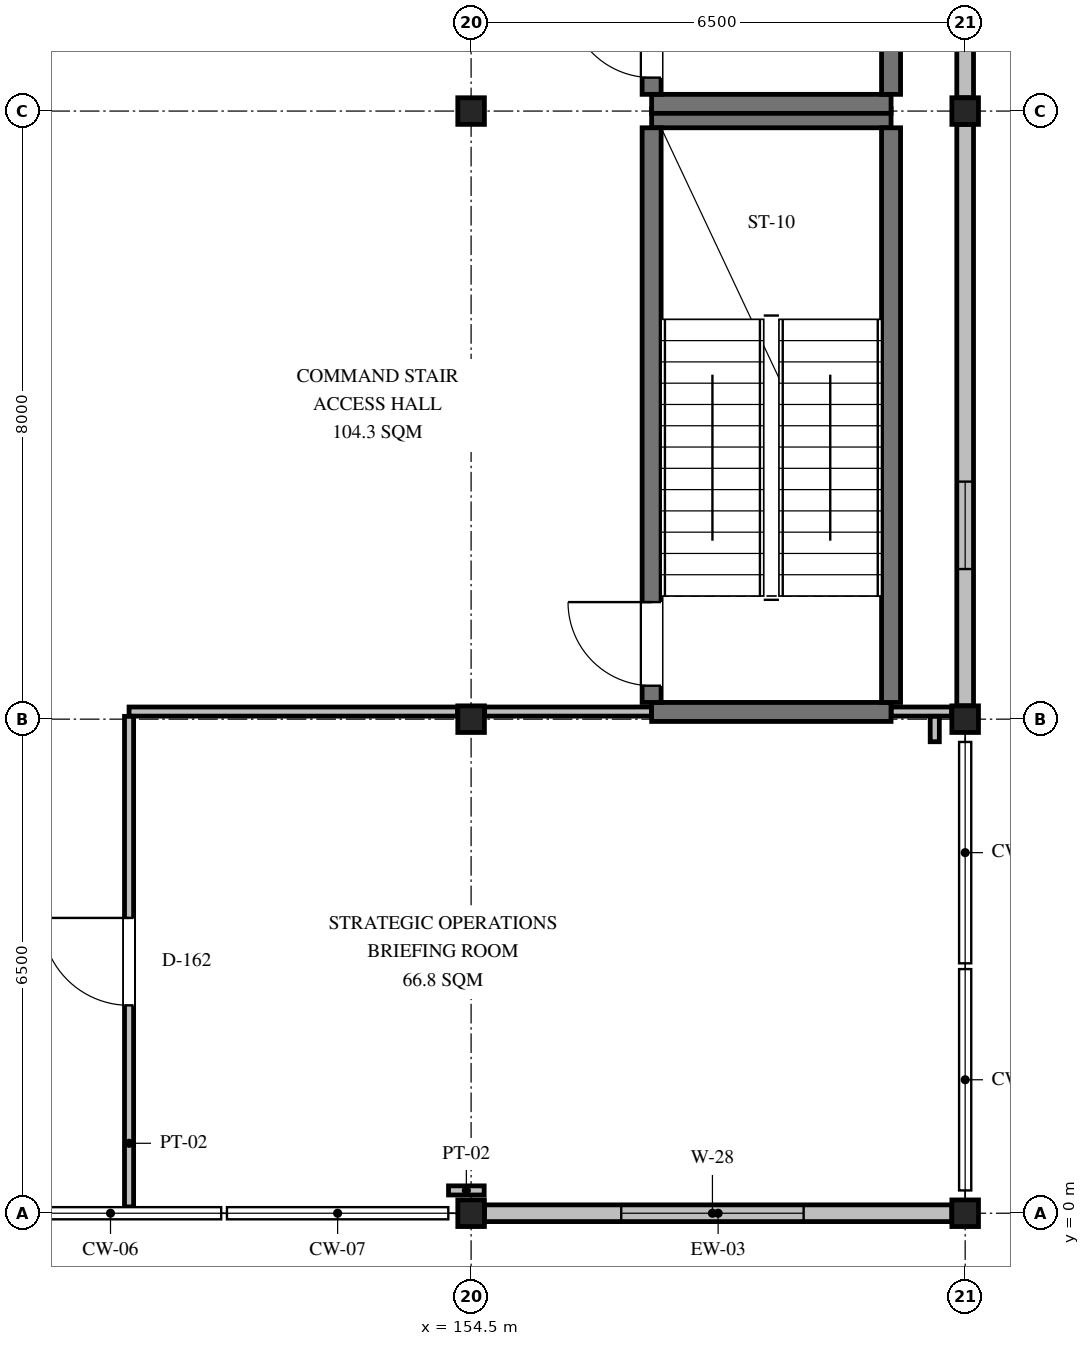
"""IFC4 building model, lengths in metres.
Left out: names, types, materials, properties, quantities, classifications, styles, units other than length and angle.
Written with IfcOpenShell. Run it as: python <this file> out.ifc"""

import sys

from ifc_helpers import new_model, si_unit, direction, frame, frame_2d, origin, origin_2d, place, context, subcontext, project, spatial, rectangle, i_section, extrude, element, fill, save


model = new_model("IFC4")
c1 = context("Model", 3, precision=1e-05, world=origin(), true_north=direction((0.0, 1.0)))
c2 = subcontext(c1, "Body", "Model", "MODEL_VIEW")
j1 = project(units=[si_unit("LENGTHUNIT", "METRE"), si_unit("PLANEANGLEUNIT", "RADIAN")], contexts=[c1])
p1 = place(None, origin())
s1 = spatial("IfcSite", under=j1, at=p1, CompositionType="ELEMENT")
p2 = place(p1, origin())
s2 = spatial("IfcBuilding", under=s1, at=p2, CompositionType="ELEMENT")
p3 = place(p2, frame((0.0, 0.0, 10.05)))
s3 = spatial("IfcBuildingStorey", under=s2, at=p3, CompositionType="ELEMENT", Elevation=10.05)
for number, where, z_axis, x_axis in (
    (1, (154.5, 0.0, 0.0), (0.0, 0.0, 1.0), (1.0, 0.0, 0.0)),
    (2, (154.5, 6.5, 0.0), (0.0, 0.0, 1.0), (1.0, 0.0, 0.0)),
    (3, (154.5, 14.5, 0.0), (0.0, 0.0, 1.0), (1.0, 0.0, 0.0)),
    (4, (161.0, 0.0, 0.0), (0.0, 0.0, 1.0), (1.0, 0.0, 0.0)),
    (5, (161.0, 6.5, 0.0), (0.0, 0.0, 1.0), (1.0, 0.0, 0.0)),
    (6, (161.0, 14.5, 0.0), (0.0, 0.0, 1.0), (1.0, 0.0, 0.0)),
):
    element("IfcColumn", number, at=place(p3, frame(where, z_axis=z_axis, x_axis=x_axis)), inside=s3, PredefinedType="COLUMN", context=c2, shape_type="SweptSolid", body=[
        extrude(i_section(OverallWidth=0.35, OverallDepth=0.35, WebThickness=0.012, FlangeThickness=0.019, FilletRadius=0.02, at=origin_2d()), origin(), (0.0, 0.0, 1.0), 4.2),
    ])
p4 = place(p3, frame((154.675, 0.0, 0.0), z_axis=(0.0, 0.0, 1.0), x_axis=(1.0, 0.0, 0.0)))
e7 = element("IfcWall", 7, at=p4, inside=s3, PredefinedType="SOLIDWALL", context=c2, shape_type="SweptSolid", body=[
    extrude(rectangle(XDim=6.15, YDim=0.22, at=frame_2d((3.075, 0.0))), origin(), (0.0, 0.0, 1.0), 3.594),
])
p5 = place(p4, frame((1.8, 0.0, 1.0)))
e8 = element("IfcOpeningElement", 8, at=p5, cuts=e7, PredefinedType="OPENING", context=c2, shape_type="SweptSolid", body=[
    extrude(rectangle(XDim=2.4, YDim=1.8, at=frame_2d((1.2, 0.9))), frame((0.0, 0.12, 0.0), z_axis=(0.0, -1.0, 0.0), x_axis=(1.0, 0.0, 0.0)), (0.0, 0.0, 1.0), 0.24),
])
p6 = place(p3, frame((161.0, 6.675, 0.0), z_axis=(0.0, 0.0, 1.0), x_axis=(0.0, 1.0, 0.0)))
e9 = element("IfcWall", 9, at=p6, inside=s3, PredefinedType="SOLIDWALL", context=c2, shape_type="SweptSolid", body=[
    extrude(rectangle(XDim=7.65, YDim=0.22, at=frame_2d((3.825, 0.0))), origin(), (0.0, 0.0, 1.0), 3.594),
])
p7 = place(p6, frame((1.8, 0.0, 1.05)))
e10 = element("IfcOpeningElement", 10, at=p7, cuts=e9, PredefinedType="OPENING", context=c2, shape_type="SweptSolid", body=[
    extrude(rectangle(XDim=1.15, YDim=2.0, at=frame_2d((0.575, 1.0))), frame((0.0, 0.12, 0.0), z_axis=(0.0, -1.0, 0.0), x_axis=(1.0, 0.0, 0.0)), (0.0, 0.0, 1.0), 0.24),
])
p8 = place(p3, frame((161.0, 14.675, 0.0), z_axis=(0.0, 0.0, 1.0), x_axis=(0.0, 1.0, 0.0)))
e11 = element("IfcWall", 11, at=p8, inside=s3, PredefinedType="SOLIDWALL", context=c2, shape_type="SweptSolid", body=[
    extrude(rectangle(XDim=7.65, YDim=0.22, at=frame_2d((3.825, 0.0))), origin(), (0.0, 0.0, 1.0), 3.554),
])
p9 = place(p8, frame((1.8, 0.0, 1.05)))
e12 = element("IfcOpeningElement", 12, at=p9, cuts=e11, PredefinedType="OPENING", context=c2, shape_type="SweptSolid", body=[
    extrude(rectangle(XDim=1.3, YDim=2.0, at=frame_2d((0.65, 1.0))), frame((0.0, 0.12, 0.0), z_axis=(0.0, -1.0, 0.0), x_axis=(1.0, 0.0, 0.0)), (0.0, 0.0, 1.0), 0.24),
])
for number, where, z_axis, x_axis in (
    (13, (156.875, 6.595, 0.0), (0.0, 0.0, 1.0), (1.0, 0.0, 0.0)),
    (14, (156.875, 14.405, 0.0), (0.0, 0.0, 1.0), (1.0, 0.0, 0.0)),
):
    element("IfcWall", number, at=place(p3, frame(where, z_axis=z_axis, x_axis=x_axis)), inside=s3, PredefinedType="SHEAR", context=c2, shape_type="SweptSolid", body=[
        extrude(rectangle(XDim=3.15, YDim=0.25, at=frame_2d((1.575, 0.0))), origin(), (0.0, 0.0, 1.0), 4.0),
    ])
p10 = place(p3, frame((156.875, 6.72, 0.0), z_axis=(0.0, 0.0, 1.0), x_axis=(0.0, 1.0, 0.0)))
e15 = element("IfcWall", 15, at=p10, inside=s3, PredefinedType="SHEAR", context=c2, shape_type="SweptSolid", body=[
    extrude(rectangle(XDim=7.56, YDim=0.25, at=frame_2d((3.78, 0.0))), origin(), (0.0, 0.0, 1.0), 4.0),
])
p11 = place(p10, frame((0.22, 0.0, 0.0)))
e16 = element("IfcOpeningElement", 16, at=p11, cuts=e15, PredefinedType="OPENING", context=c2, shape_type="SweptSolid", body=[
    extrude(rectangle(XDim=1.1, YDim=2.15, at=frame_2d((0.55, 1.075))), frame((0.0, 0.135, 0.0), z_axis=(0.0, -1.0, 0.0), x_axis=(1.0, 0.0, 0.0)), (0.0, 0.0, 1.0), 0.27),
])
p12 = place(p3, frame((160.025, 6.72, 0.0), z_axis=(0.0, 0.0, 1.0), x_axis=(0.0, 1.0, 0.0)))
e17 = element("IfcWall", 17, at=p12, inside=s3, PredefinedType="SHEAR", context=c2, shape_type="SweptSolid", body=[
    extrude(rectangle(XDim=7.56, YDim=0.25, at=frame_2d((3.78, 0.0))), origin(), (0.0, 0.0, 1.0), 4.0),
])
p13 = place(p3, frame((156.875, 14.595, 0.0), z_axis=(0.0, 0.0, 1.0), x_axis=(1.0, 0.0, 0.0)))
e18 = element("IfcWall", 18, at=p13, inside=s3, PredefinedType="SHEAR", context=c2, shape_type="SweptSolid", body=[
    extrude(rectangle(XDim=3.15, YDim=0.25, at=frame_2d((1.575, 0.0))), origin(), (0.0, 0.0, 1.0), 4.0),
])
p14 = place(p3, frame((156.875, 14.72, 0.0), z_axis=(0.0, 0.0, 1.0), x_axis=(0.0, 1.0, 0.0)))
e19 = element("IfcWall", 19, at=p14, inside=s3, PredefinedType="SHEAR", context=c2, shape_type="SweptSolid", body=[
    extrude(rectangle(XDim=7.56, YDim=0.25, at=frame_2d((3.78, 0.0))), origin(), (0.0, 0.0, 1.0), 4.0),
])
p15 = place(p14, frame((0.22, 0.0, 0.0)))
e20 = element("IfcOpeningElement", 20, at=p15, cuts=e19, PredefinedType="OPENING", context=c2, shape_type="SweptSolid", body=[
    extrude(rectangle(XDim=1.1, YDim=2.15, at=frame_2d((0.55, 1.075))), frame((0.0, 0.135, 0.0), z_axis=(0.0, -1.0, 0.0), x_axis=(1.0, 0.0, 0.0)), (0.0, 0.0, 1.0), 0.27),
])
p16 = place(p3, frame((160.025, 14.72, 0.0), z_axis=(0.0, 0.0, 1.0), x_axis=(0.0, 1.0, 0.0)))
e21 = element("IfcWall", 21, at=p16, inside=s3, PredefinedType="SHEAR", context=c2, shape_type="SweptSolid", body=[
    extrude(rectangle(XDim=7.56, YDim=0.25, at=frame_2d((3.78, 0.0))), origin(), (0.0, 0.0, 1.0), 4.0),
])
p17 = place(p3, frame((154.203, 0.3, 0.0), z_axis=(0.0, 0.0, 1.0), x_axis=(1.0, 0.0, 0.0)))
e22 = element("IfcWall", 22, at=p17, inside=s3, PredefinedType="PARTITIONING", context=c2, shape_type="SweptSolid", body=[
    extrude(rectangle(XDim=0.469, YDim=0.12, at=frame_2d((0.235, 0.0))), origin(), (0.0, 0.0, 1.0), 4.0),
])
p18 = place(p3, frame((150.0, 6.6, 0.0), z_axis=(0.0, 0.0, 1.0), x_axis=(1.0, 0.0, 0.0)))
e23 = element("IfcWall", 23, at=p18, inside=s3, PredefinedType="PARTITIONING", context=c2, shape_type="SweptSolid", body=[
    extrude(rectangle(XDim=4.322, YDim=0.12, at=frame_2d((2.161, 0.0))), origin(), (0.0, 0.0, 1.0), 3.294),
])
p19 = place(p3, frame((154.678, 6.6, 0.0), z_axis=(0.0, 0.0, 1.0), x_axis=(1.0, 0.0, 0.0)))
e24 = element("IfcWall", 24, at=p19, inside=s3, PredefinedType="PARTITIONING", context=c2, shape_type="SweptSolid", body=[
    extrude(rectangle(XDim=2.194, YDim=0.12, at=frame_2d((1.097, 0.0))), origin(), (0.0, 0.0, 1.0), 4.0),
])
p20 = place(p3, frame((160.028, 6.6, 0.0), z_axis=(0.0, 0.0, 1.0), x_axis=(1.0, 0.0, 0.0)))
e25 = element("IfcWall", 25, at=p20, inside=s3, PredefinedType="PARTITIONING", context=c2, shape_type="SweptSolid", body=[
    extrude(rectangle(XDim=0.794, YDim=0.12, at=frame_2d((0.397, 0.0))), origin(), (0.0, 0.0, 1.0), 4.0),
])
p21 = place(p3, frame((150.0, 0.083, 0.0), z_axis=(0.0, 0.0, 1.0), x_axis=(0.0, 1.0, 0.0)))
e26 = element("IfcWall", 26, at=p21, inside=s3, PredefinedType="PARTITIONING", context=c2, shape_type="SweptSolid", body=[
    extrude(rectangle(XDim=6.454, YDim=0.12, at=frame_2d((3.227, 0.0))), origin(), (0.0, 0.0, 1.0), 3.75),
])
p22 = place(p21, frame((2.652, 0.0, 0.0)))
e27 = element("IfcOpeningElement", 27, at=p22, cuts=e26, PredefinedType="OPENING", context=c2, shape_type="SweptSolid", body=[
    extrude(rectangle(XDim=1.15, YDim=2.1, at=frame_2d((0.575, 1.05))), frame((0.0, 0.07, 0.0), z_axis=(0.0, -1.0, 0.0), x_axis=(1.0, 0.0, 0.0)), (0.0, 0.0, 1.0), 0.14),
])
p23 = place(p3, frame((160.6, 6.203, 0.0), z_axis=(0.0, 0.0, 1.0), x_axis=(0.0, 1.0, 0.0)))
e28 = element("IfcWall", 28, at=p23, inside=s3, PredefinedType="PARTITIONING", context=c2, shape_type="SweptSolid", body=[
    extrude(rectangle(XDim=0.334, YDim=0.12, at=frame_2d((0.167, 0.0))), origin(), (0.0, 0.0, 1.0), 4.0),
])
p24 = place(p5, origin())
e29 = element("IfcWindow", 29, at=p24, inside=s3, PartitioningType="SINGLE_PANEL", PredefinedType="WINDOW", context=c2, shape_type="SweptSolid", body=[
    extrude(rectangle(XDim=2.4, YDim=1.8, at=frame_2d((1.2, 0.9))), frame((0.0, 0.03, 0.0), z_axis=(0.0, -1.0, 0.0), x_axis=(1.0, 0.0, 0.0)), (0.0, 0.0, 1.0), 0.06),
])
fill(e8, e29)
p25 = place(p7, origin())
e30 = element("IfcWindow", 30, at=p25, inside=s3, PartitioningType="SINGLE_PANEL", PredefinedType="WINDOW", context=c2, shape_type="SweptSolid", body=[
    extrude(rectangle(XDim=1.15, YDim=2.0, at=frame_2d((0.575, 1.0))), frame((0.0, 0.03, 0.0), z_axis=(0.0, -1.0, 0.0), x_axis=(1.0, 0.0, 0.0)), (0.0, 0.0, 1.0), 0.06),
])
fill(e10, e30)
p26 = place(p11, origin())
e31 = element("IfcDoor", 31, at=p26, inside=s3, OperationType="SINGLE_SWING_RIGHT", PredefinedType="DOOR", context=c2, shape_type="SweptSolid", body=[
    extrude(rectangle(XDim=1.1, YDim=2.15, at=frame_2d((0.55, 1.075))), frame((0.0, 0.025, 0.0), z_axis=(0.0, -1.0, 0.0), x_axis=(1.0, 0.0, 0.0)), (0.0, 0.0, 1.0), 0.05),
])
fill(e16, e31)
p27 = place(p15, origin())
e32 = element("IfcDoor", 32, at=p27, inside=s3, OperationType="SINGLE_SWING_RIGHT", PredefinedType="DOOR", context=c2, shape_type="SweptSolid", body=[
    extrude(rectangle(XDim=1.1, YDim=2.15, at=frame_2d((0.55, 1.075))), frame((0.0, 0.025, 0.0), z_axis=(0.0, -1.0, 0.0), x_axis=(1.0, 0.0, 0.0)), (0.0, 0.0, 1.0), 0.05),
])
fill(e20, e32)
p28 = place(p22, origin())
e33 = element("IfcDoor", 33, at=p28, inside=s3, OperationType="SINGLE_SWING_RIGHT", PredefinedType="DOOR", context=c2, shape_type="SweptSolid", body=[
    extrude(rectangle(XDim=1.15, YDim=2.1, at=frame_2d((0.575, 1.05))), frame((0.0, 0.025, 0.0), z_axis=(0.0, -1.0, 0.0), x_axis=(1.0, 0.0, 0.0)), (0.0, 0.0, 1.0), 0.05),
])
fill(e27, e33)
save(model, sys.argv[1])
